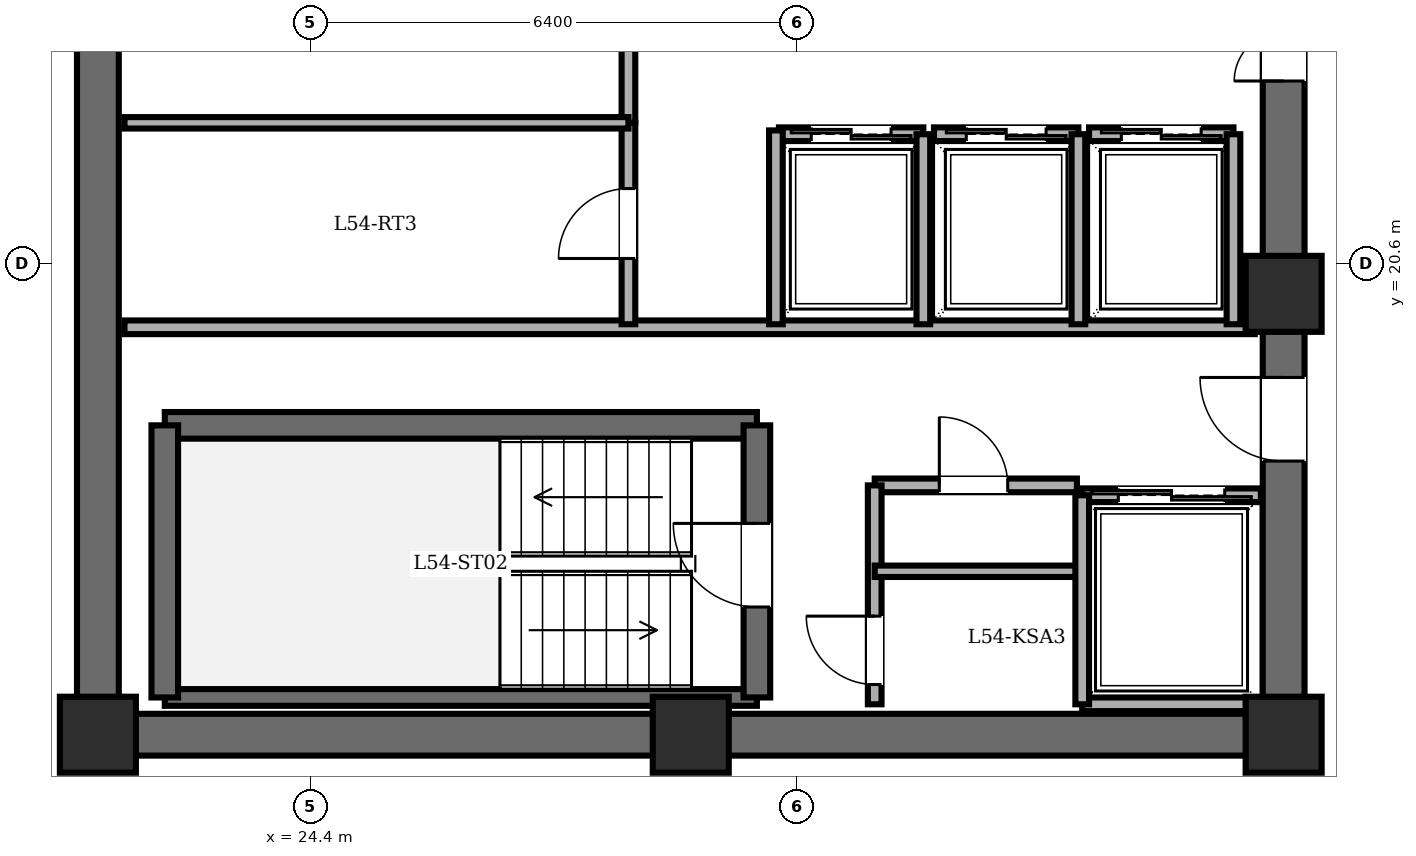
"""IFC4 building model, lengths in metres.
Left out: names, types, materials, properties, quantities, classifications, styles, units other than length and angle.
Written with IfcOpenShell. Run it as: python <this file> out.ifc"""

import sys

from ifc_helpers import new_model, si_unit, direction, frame, frame_2d, origin, origin_2d, place, context, subcontext, project, spatial, rectangle, extrude, element, fill, save


model = new_model("IFC4")
c1 = context("Model", 3, precision=1e-05, world=origin(), true_north=direction((0.0, 1.0)))
c2 = subcontext(c1, "Body", "Model", "MODEL_VIEW")
j1 = project(units=[si_unit("LENGTHUNIT", "METRE"), si_unit("PLANEANGLEUNIT", "RADIAN")], contexts=[c1])
p1 = place(None, origin())
s1 = spatial("IfcSite", under=j1, at=p1, CompositionType="ELEMENT")
p2 = place(p1, origin())
s2 = spatial("IfcBuilding", under=s1, at=p2, CompositionType="ELEMENT")
p3 = place(p2, frame((0.0, 0.0, 208.5)))
s3 = spatial("IfcBuildingStorey", under=s2, at=p3, CompositionType="ELEMENT", Elevation=208.5)
for number, where, z_axis, x_axis in (
    (1, (21.6, 14.4, 0.0), (0.0, 0.0, 1.0), (1.0, 0.0, 0.0)),
    (2, (29.4, 14.4, 0.0), (0.0, 0.0, 1.0), (1.0, 0.0, 0.0)),
    (3, (37.2, 14.4, 0.0), (0.0, 0.0, 1.0), (1.0, 0.0, 0.0)),
    (4, (37.2, 20.2, 0.0), (0.0, 0.0, 1.0), (1.0, 0.0, 0.0)),
):
    element("IfcColumn", number, at=place(p3, frame(where, z_axis=z_axis, x_axis=x_axis)), inside=s3, PredefinedType="COLUMN", context=c2, shape_type="SweptSolid", body=[
        extrude(rectangle(XDim=1.0, YDim=1.0, at=origin_2d()), origin(), (0.0, 0.0, 1.0), 3.6),
    ])
p4 = place(p3, frame((21.6, 14.4, 0.0), z_axis=(0.0, 0.0, 1.0), x_axis=(0.0, 1.0, 0.0)))
e5 = element("IfcWall", 5, at=p4, inside=s3, PredefinedType="SHEAR", context=c2, shape_type="SweptSolid", body=[
    extrude(rectangle(XDim=19.2, YDim=0.55, at=frame_2d((9.6, 0.0))), origin(), (0.0, 0.0, 1.0), 3.4),
])
p5 = place(p3, frame((37.2, 14.4, 0.0), z_axis=(0.0, 0.0, 1.0), x_axis=(-1.0, 0.0, 0.0)))
e6 = element("IfcWall", 6, at=p5, inside=s3, PredefinedType="SHEAR", context=c2, shape_type="SweptSolid", body=[
    extrude(rectangle(XDim=15.6, YDim=0.55, at=frame_2d((7.8, 0.0))), origin(), (0.0, 0.0, 1.0), 3.4),
])
p6 = place(p3, frame((37.2, 14.4, 0.0), z_axis=(0.0, 0.0, 1.0), x_axis=(0.0, 1.0, 0.0)))
e7 = element("IfcWall", 7, at=p6, inside=s3, PredefinedType="SHEAR", context=c2, shape_type="SweptSolid", body=[
    extrude(rectangle(XDim=19.2, YDim=0.55, at=frame_2d((9.6, 0.0))), origin(), (0.0, 0.0, 1.0), 3.4),
])
p7 = place(p6, frame((15.8, 0.0, 0.0)))
e8 = element("IfcOpeningElement", 8, at=p7, cuts=e7, PredefinedType="OPENING", context=c2, shape_type="SweptSolid", body=[
    extrude(rectangle(XDim=1.15, YDim=2.15, at=frame_2d((0.575, 1.075))), frame((0.0, 0.285, 0.0), z_axis=(0.0, -1.0, 0.0), x_axis=(1.0, 0.0, 0.0)), (0.0, 0.0, 1.0), 0.57),
])
p8 = place(p6, frame((3.6, 0.0, 0.0)))
e9 = element("IfcOpeningElement", 9, at=p8, cuts=e7, PredefinedType="OPENING", context=c2, shape_type="SweptSolid", body=[
    extrude(rectangle(XDim=1.1, YDim=2.15, at=frame_2d((0.55, 1.075))), frame((0.0, 0.285, 0.0), z_axis=(0.0, -1.0, 0.0), x_axis=(1.0, 0.0, 0.0)), (0.0, 0.0, 1.0), 0.57),
])
p9 = place(p6, frame((8.6, 0.0, 0.0)))
e10 = element("IfcOpeningElement", 10, at=p9, cuts=e7, PredefinedType="OPENING", context=c2, shape_type="SweptSolid", body=[
    extrude(rectangle(XDim=1.3, YDim=2.2, at=frame_2d((0.65, 1.1))), frame((0.0, 0.285, 0.0), z_axis=(0.0, -1.0, 0.0), x_axis=(1.0, 0.0, 0.0)), (0.0, 0.0, 1.0), 0.57),
])
p10 = place(p3, frame((22.48, 18.47, 0.0), z_axis=(0.0, 0.0, 1.0), x_axis=(1.0, 0.0, 0.0)))
e11 = element("IfcWall", 11, at=p10, inside=s3, PredefinedType="SOLIDWALL", context=c2, shape_type="SweptSolid", body=[
    extrude(rectangle(XDim=7.79, YDim=0.35, at=frame_2d((3.895, 0.0))), origin(), (0.0, 0.0, 1.0), 3.4),
])
p11 = place(p3, frame((22.48, 14.89, 0.0), z_axis=(0.0, 0.0, 1.0), x_axis=(1.0, 0.0, 0.0)))
e12 = element("IfcWall", 12, at=p11, inside=s3, PredefinedType="PARTITIONING", context=c2, shape_type="SweptSolid", body=[
    extrude(rectangle(XDim=7.79, YDim=0.22, at=frame_2d((3.895, 0.0))), origin(), (0.0, 0.0, 1.0), 3.4),
])
p12 = place(p3, frame((22.48, 14.89, 0.0), z_axis=(0.0, 0.0, 1.0), x_axis=(0.0, 1.0, 0.0)))
e13 = element("IfcWall", 13, at=p12, inside=s3, PredefinedType="SOLIDWALL", context=c2, shape_type="SweptSolid", body=[
    extrude(rectangle(XDim=3.58, YDim=0.35, at=frame_2d((1.79, 0.0))), origin(), (0.0, 0.0, 1.0), 3.4),
])
p13 = place(p3, frame((30.27, 14.89, 0.0), z_axis=(0.0, 0.0, 1.0), x_axis=(0.0, 1.0, 0.0)))
e14 = element("IfcWall", 14, at=p13, inside=s3, PredefinedType="SOLIDWALL", context=c2, shape_type="SweptSolid", body=[
    extrude(rectangle(XDim=3.58, YDim=0.35, at=frame_2d((1.79, 0.0))), origin(), (0.0, 0.0, 1.0), 3.4),
])
p14 = place(p13, frame((1.19, 0.0, 0.0)))
e15 = element("IfcOpeningElement", 15, at=p14, cuts=e14, PredefinedType="OPENING", context=c2, shape_type="SweptSolid", body=[
    extrude(rectangle(XDim=1.1, YDim=2.15, at=frame_2d((0.55, 1.075))), frame((0.0, 0.185, 0.0), z_axis=(0.0, -1.0, 0.0), x_axis=(1.0, 0.0, 0.0)), (0.0, 0.0, 1.0), 0.37),
])
p15 = place(p3, frame((21.95, 19.76, 0.0), z_axis=(0.0, 0.0, 1.0), x_axis=(1.0, 0.0, 0.0)))
e16 = element("IfcWall", 16, at=p15, inside=s3, PredefinedType="PARTITIONING", context=c2, shape_type="SweptSolid", body=[
    extrude(rectangle(XDim=14.87, YDim=0.18, at=frame_2d((7.435, 0.0))), origin(), (0.0, 0.0, 1.0), 3.4),
])
p16 = place(p3, frame((31.82, 17.68, 0.0), z_axis=(0.0, 0.0, 1.0), x_axis=(1.0, 0.0, 0.0)))
e17 = element("IfcWall", 17, at=p16, inside=s3, PredefinedType="PARTITIONING", context=c2, shape_type="SweptSolid", body=[
    extrude(rectangle(XDim=2.66, YDim=0.18, at=frame_2d((1.33, 0.0))), origin(), (0.0, 0.0, 1.0), 3.4),
])
p17 = place(p16, frame((0.85, 0.0, 0.0)))
e18 = element("IfcOpeningElement", 18, at=p17, cuts=e17, PredefinedType="OPENING", context=c2, shape_type="SweptSolid", body=[
    extrude(rectangle(XDim=0.9, YDim=2.05, at=frame_2d((0.45, 1.025))), frame((0.0, 0.1, 0.0), z_axis=(0.0, -1.0, 0.0), x_axis=(1.0, 0.0, 0.0)), (0.0, 0.0, 1.0), 0.2),
])
p18 = place(p3, frame((31.82, 14.8, 0.0), z_axis=(0.0, 0.0, 1.0), x_axis=(0.0, 1.0, 0.0)))
e19 = element("IfcWall", 19, at=p18, inside=s3, PredefinedType="PARTITIONING", context=c2, shape_type="SweptSolid", body=[
    extrude(rectangle(XDim=2.88, YDim=0.18, at=frame_2d((1.44, 0.0))), origin(), (0.0, 0.0, 1.0), 3.4),
])
p19 = place(p18, frame((0.26, 0.0, 0.0)))
e20 = element("IfcOpeningElement", 20, at=p19, cuts=e19, PredefinedType="OPENING", context=c2, shape_type="SweptSolid", body=[
    extrude(rectangle(XDim=0.9, YDim=2.05, at=frame_2d((0.45, 1.025))), frame((0.0, 0.1, 0.0), z_axis=(0.0, -1.0, 0.0), x_axis=(1.0, 0.0, 0.0)), (0.0, 0.0, 1.0), 0.2),
])
p20 = place(p3, frame((31.82, 16.55, 0.0), z_axis=(0.0, 0.0, 1.0), x_axis=(1.0, 0.0, 0.0)))
e21 = element("IfcWall", 21, at=p20, inside=s3, PredefinedType="PARTITIONING", context=c2, shape_type="SweptSolid", body=[
    extrude(rectangle(XDim=2.66, YDim=0.15, at=frame_2d((1.33, 0.0))), origin(), (0.0, 0.0, 1.0), 3.4),
])
p21 = place(p3, frame((34.55, 17.55, 0.0), z_axis=(0.0, 0.0, 1.0), x_axis=(1.0, 0.0, 0.0)))
e22 = element("IfcWall", 22, at=p21, inside=s3, PredefinedType="PARTITIONING", context=c2, shape_type="SweptSolid", body=[
    extrude(rectangle(XDim=2.35, YDim=0.18, at=frame_2d((1.175, 0.0))), origin(), (0.0, 0.0, 1.0), 3.4),
])
p22 = place(p21, frame((0.475, 0.0, 0.0)))
e23 = element("IfcOpeningElement", 23, at=p22, cuts=e22, PredefinedType="OPENING", context=c2, shape_type="SweptSolid", body=[
    extrude(rectangle(XDim=1.4, YDim=2.3, at=frame_2d((0.7, 1.15))), frame((0.0, 0.1, 0.0), z_axis=(0.0, -1.0, 0.0), x_axis=(1.0, 0.0, 0.0)), (0.0, 0.0, 1.0), 0.2),
])
p23 = place(p3, frame((36.9, 14.8, 0.0), z_axis=(0.0, 0.0, 1.0), x_axis=(-1.0, 0.0, 0.0)))
e24 = element("IfcWall", 24, at=p23, inside=s3, PredefinedType="PARTITIONING", context=c2, shape_type="SweptSolid", body=[
    extrude(rectangle(XDim=2.35, YDim=0.18, at=frame_2d((1.175, 0.0))), origin(), (0.0, 0.0, 1.0), 3.4),
])
p24 = place(p3, frame((34.55, 17.55, 0.0), z_axis=(0.0, 0.0, 1.0), x_axis=(0.0, -1.0, 0.0)))
e25 = element("IfcWall", 25, at=p24, inside=s3, PredefinedType="PARTITIONING", context=c2, shape_type="SweptSolid", body=[
    extrude(rectangle(XDim=2.75, YDim=0.18, at=frame_2d((1.375, 0.0))), origin(), (0.0, 0.0, 1.0), 3.4),
])
p25 = place(p3, frame((30.56, 22.3, 0.0), z_axis=(0.0, 0.0, 1.0), x_axis=(1.0, 0.0, 0.0)))
e26 = element("IfcWall", 26, at=p25, inside=s3, PredefinedType="PARTITIONING", context=c2, shape_type="SweptSolid", body=[
    extrude(rectangle(XDim=1.9, YDim=0.18, at=frame_2d((0.95, 0.0))), origin(), (0.0, 0.0, 1.0), 3.4),
])
p26 = place(p25, frame((0.425, 0.0, 0.0)))
e27 = element("IfcOpeningElement", 27, at=p26, cuts=e26, PredefinedType="OPENING", context=c2, shape_type="SweptSolid", body=[
    extrude(rectangle(XDim=1.05, YDim=2.2, at=frame_2d((0.525, 1.1))), frame((0.0, 0.1, 0.0), z_axis=(0.0, -1.0, 0.0), x_axis=(1.0, 0.0, 0.0)), (0.0, 0.0, 1.0), 0.2),
])
p27 = place(p3, frame((32.46, 19.8, 0.0), z_axis=(0.0, 0.0, 1.0), x_axis=(0.0, 1.0, 0.0)))
e28 = element("IfcWall", 28, at=p27, inside=s3, PredefinedType="PARTITIONING", context=c2, shape_type="SweptSolid", body=[
    extrude(rectangle(XDim=2.5, YDim=0.18, at=frame_2d((1.25, 0.0))), origin(), (0.0, 0.0, 1.0), 3.4),
])
p28 = place(p3, frame((32.6, 22.3, 0.0), z_axis=(0.0, 0.0, 1.0), x_axis=(1.0, 0.0, 0.0)))
e29 = element("IfcWall", 29, at=p28, inside=s3, PredefinedType="PARTITIONING", context=c2, shape_type="SweptSolid", body=[
    extrude(rectangle(XDim=1.9, YDim=0.18, at=frame_2d((0.95, 0.0))), origin(), (0.0, 0.0, 1.0), 3.4),
])
p29 = place(p28, frame((0.425, 0.0, 0.0)))
e30 = element("IfcOpeningElement", 30, at=p29, cuts=e29, PredefinedType="OPENING", context=c2, shape_type="SweptSolid", body=[
    extrude(rectangle(XDim=1.05, YDim=2.2, at=frame_2d((0.525, 1.1))), frame((0.0, 0.1, 0.0), z_axis=(0.0, -1.0, 0.0), x_axis=(1.0, 0.0, 0.0)), (0.0, 0.0, 1.0), 0.2),
])
p30 = place(p3, frame((34.5, 19.8, 0.0), z_axis=(0.0, 0.0, 1.0), x_axis=(0.0, 1.0, 0.0)))
e31 = element("IfcWall", 31, at=p30, inside=s3, PredefinedType="PARTITIONING", context=c2, shape_type="SweptSolid", body=[
    extrude(rectangle(XDim=2.5, YDim=0.18, at=frame_2d((1.25, 0.0))), origin(), (0.0, 0.0, 1.0), 3.4),
])
p31 = place(p3, frame((34.64, 22.3, 0.0), z_axis=(0.0, 0.0, 1.0), x_axis=(1.0, 0.0, 0.0)))
e32 = element("IfcWall", 32, at=p31, inside=s3, PredefinedType="PARTITIONING", context=c2, shape_type="SweptSolid", body=[
    extrude(rectangle(XDim=1.9, YDim=0.18, at=frame_2d((0.95, 0.0))), origin(), (0.0, 0.0, 1.0), 3.4),
])
p32 = place(p31, frame((0.425, 0.0, 0.0)))
e33 = element("IfcOpeningElement", 33, at=p32, cuts=e32, PredefinedType="OPENING", context=c2, shape_type="SweptSolid", body=[
    extrude(rectangle(XDim=1.05, YDim=2.2, at=frame_2d((0.525, 1.1))), frame((0.0, 0.1, 0.0), z_axis=(0.0, -1.0, 0.0), x_axis=(1.0, 0.0, 0.0)), (0.0, 0.0, 1.0), 0.2),
])
p33 = place(p3, frame((36.54, 19.8, 0.0), z_axis=(0.0, 0.0, 1.0), x_axis=(0.0, 1.0, 0.0)))
e34 = element("IfcWall", 34, at=p33, inside=s3, PredefinedType="PARTITIONING", context=c2, shape_type="SweptSolid", body=[
    extrude(rectangle(XDim=2.5, YDim=0.18, at=frame_2d((1.25, 0.0))), origin(), (0.0, 0.0, 1.0), 3.4),
])
p34 = place(p3, frame((30.52, 19.8, 0.0), z_axis=(0.0, 0.0, 1.0), x_axis=(0.0, 1.0, 0.0)))
e35 = element("IfcWall", 35, at=p34, inside=s3, PredefinedType="PARTITIONING", context=c2, shape_type="SweptSolid", body=[
    extrude(rectangle(XDim=2.55, YDim=0.18, at=frame_2d((1.275, 0.0))), origin(), (0.0, 0.0, 1.0), 3.4),
])
p35 = place(p3, frame((28.58, 22.45, 0.0), z_axis=(0.0, 0.0, 1.0), x_axis=(0.0, 1.0, 0.0)))
e36 = element("IfcWall", 36, at=p35, inside=s3, PredefinedType="PARTITIONING", context=c2, shape_type="SweptSolid", body=[
    extrude(rectangle(XDim=2.9, YDim=0.18, at=frame_2d((1.45, 0.0))), origin(), (0.0, 0.0, 1.0), 3.4),
])
p36 = place(p35, frame((0.99, 0.0, 0.0)))
e37 = element("IfcOpeningElement", 37, at=p36, cuts=e36, PredefinedType="OPENING", context=c2, shape_type="SweptSolid", body=[
    extrude(rectangle(XDim=0.92, YDim=2.1, at=frame_2d((0.46, 1.05))), frame((0.0, 0.1, 0.0), z_axis=(0.0, -1.0, 0.0), x_axis=(1.0, 0.0, 0.0)), (0.0, 0.0, 1.0), 0.2),
])
p37 = place(p3, frame((28.58, 19.8, 0.0), z_axis=(0.0, 0.0, 1.0), x_axis=(0.0, 1.0, 0.0)))
e38 = element("IfcWall", 38, at=p37, inside=s3, PredefinedType="PARTITIONING", context=c2, shape_type="SweptSolid", body=[
    extrude(rectangle(XDim=2.65, YDim=0.18, at=frame_2d((1.325, 0.0))), origin(), (0.0, 0.0, 1.0), 3.4),
])
p38 = place(p37, frame((0.865, 0.0, 0.0)))
e39 = element("IfcOpeningElement", 39, at=p38, cuts=e38, PredefinedType="OPENING", context=c2, shape_type="SweptSolid", body=[
    extrude(rectangle(XDim=0.92, YDim=2.1, at=frame_2d((0.46, 1.05))), frame((0.0, 0.1, 0.0), z_axis=(0.0, -1.0, 0.0), x_axis=(1.0, 0.0, 0.0)), (0.0, 0.0, 1.0), 0.2),
])
p39 = place(p3, frame((21.95, 22.45, 0.0), z_axis=(0.0, 0.0, 1.0), x_axis=(1.0, 0.0, 0.0)))
e40 = element("IfcWall", 40, at=p39, inside=s3, PredefinedType="PARTITIONING", context=c2, shape_type="SweptSolid", body=[
    extrude(rectangle(XDim=6.63, YDim=0.15, at=frame_2d((3.315, 0.0))), origin(), (0.0, 0.0, 1.0), 3.4),
])
p40 = place(p14, origin())
e41 = element("IfcDoor", 41, at=p40, inside=s3, OperationType="SINGLE_SWING_RIGHT", PredefinedType="DOOR", context=c2, shape_type="SweptSolid", body=[
    extrude(rectangle(XDim=1.1, YDim=2.15, at=frame_2d((0.55, 1.075))), frame((0.0, 0.025, 0.0), z_axis=(0.0, -1.0, 0.0), x_axis=(1.0, 0.0, 0.0)), (0.0, 0.0, 1.0), 0.05),
])
fill(e15, e41)
p41 = place(p8, origin())
e42 = element("IfcDoor", 42, at=p41, inside=s3, OperationType="SINGLE_SWING_RIGHT", PredefinedType="DOOR", context=c2, shape_type="SweptSolid", body=[
    extrude(rectangle(XDim=1.1, YDim=2.15, at=frame_2d((0.55, 1.075))), frame((0.0, 0.025, 0.0), z_axis=(0.0, -1.0, 0.0), x_axis=(1.0, 0.0, 0.0)), (0.0, 0.0, 1.0), 0.05),
])
fill(e9, e42)
p42 = place(p17, origin())
e43 = element("IfcDoor", 43, at=p42, inside=s3, OperationType="SINGLE_SWING_LEFT", PredefinedType="DOOR", context=c2, shape_type="SweptSolid", body=[
    extrude(rectangle(XDim=0.9, YDim=2.05, at=frame_2d((0.45, 1.025))), frame((0.0, 0.025, 0.0), z_axis=(0.0, -1.0, 0.0), x_axis=(1.0, 0.0, 0.0)), (0.0, 0.0, 1.0), 0.05),
])
fill(e18, e43)
p43 = place(p19, origin())
e44 = element("IfcDoor", 44, at=p43, inside=s3, OperationType="SINGLE_SWING_RIGHT", PredefinedType="DOOR", context=c2, shape_type="SweptSolid", body=[
    extrude(rectangle(XDim=0.9, YDim=2.05, at=frame_2d((0.45, 1.025))), frame((0.0, 0.025, 0.0), z_axis=(0.0, -1.0, 0.0), x_axis=(1.0, 0.0, 0.0)), (0.0, 0.0, 1.0), 0.05),
])
fill(e20, e44)
p44 = place(p22, origin())
e45 = element("IfcDoor", 45, at=p44, inside=s3, OperationType="DOUBLE_DOOR_SLIDING", PredefinedType="DOOR", context=c2, shape_type="SweptSolid", body=[
    extrude(rectangle(XDim=1.4, YDim=2.3, at=frame_2d((0.7, 1.15))), frame((0.0, 0.025, 0.0), z_axis=(0.0, -1.0, 0.0), x_axis=(1.0, 0.0, 0.0)), (0.0, 0.0, 1.0), 0.05),
])
fill(e23, e45)
p45 = place(p26, origin())
e46 = element("IfcDoor", 46, at=p45, inside=s3, OperationType="DOUBLE_DOOR_SLIDING", PredefinedType="DOOR", context=c2, shape_type="SweptSolid", body=[
    extrude(rectangle(XDim=1.05, YDim=2.2, at=frame_2d((0.525, 1.1))), frame((0.0, 0.025, 0.0), z_axis=(0.0, -1.0, 0.0), x_axis=(1.0, 0.0, 0.0)), (0.0, 0.0, 1.0), 0.05),
])
fill(e27, e46)
p46 = place(p29, origin())
e47 = element("IfcDoor", 47, at=p46, inside=s3, OperationType="DOUBLE_DOOR_SLIDING", PredefinedType="DOOR", context=c2, shape_type="SweptSolid", body=[
    extrude(rectangle(XDim=1.05, YDim=2.2, at=frame_2d((0.525, 1.1))), frame((0.0, 0.025, 0.0), z_axis=(0.0, -1.0, 0.0), x_axis=(1.0, 0.0, 0.0)), (0.0, 0.0, 1.0), 0.05),
])
fill(e30, e47)
p47 = place(p32, origin())
e48 = element("IfcDoor", 48, at=p47, inside=s3, OperationType="DOUBLE_DOOR_SLIDING", PredefinedType="DOOR", context=c2, shape_type="SweptSolid", body=[
    extrude(rectangle(XDim=1.05, YDim=2.2, at=frame_2d((0.525, 1.1))), frame((0.0, 0.025, 0.0), z_axis=(0.0, -1.0, 0.0), x_axis=(1.0, 0.0, 0.0)), (0.0, 0.0, 1.0), 0.05),
])
fill(e33, e48)
p48 = place(p38, origin())
e49 = element("IfcDoor", 49, at=p48, inside=s3, OperationType="SINGLE_SWING_LEFT", PredefinedType="DOOR", context=c2, shape_type="SweptSolid", body=[
    extrude(rectangle(XDim=0.92, YDim=2.1, at=frame_2d((0.46, 1.05))), frame((0.0, 0.025, 0.0), z_axis=(0.0, -1.0, 0.0), x_axis=(1.0, 0.0, 0.0)), (0.0, 0.0, 1.0), 0.05),
])
fill(e39, e49)
p49 = place(p9, origin())
e50 = element("IfcDoor", 50, at=p49, inside=s3, OperationType="DOUBLE_DOOR_SINGLE_SWING", PredefinedType="DOOR", context=c2, shape_type="SweptSolid", body=[
    extrude(rectangle(XDim=1.3, YDim=2.2, at=frame_2d((0.65, 1.1))), frame((0.0, 0.025, 0.0), z_axis=(0.0, -1.0, 0.0), x_axis=(1.0, 0.0, 0.0)), (0.0, 0.0, 1.0), 0.05),
])
fill(e10, e50)
save(model, sys.argv[1])
